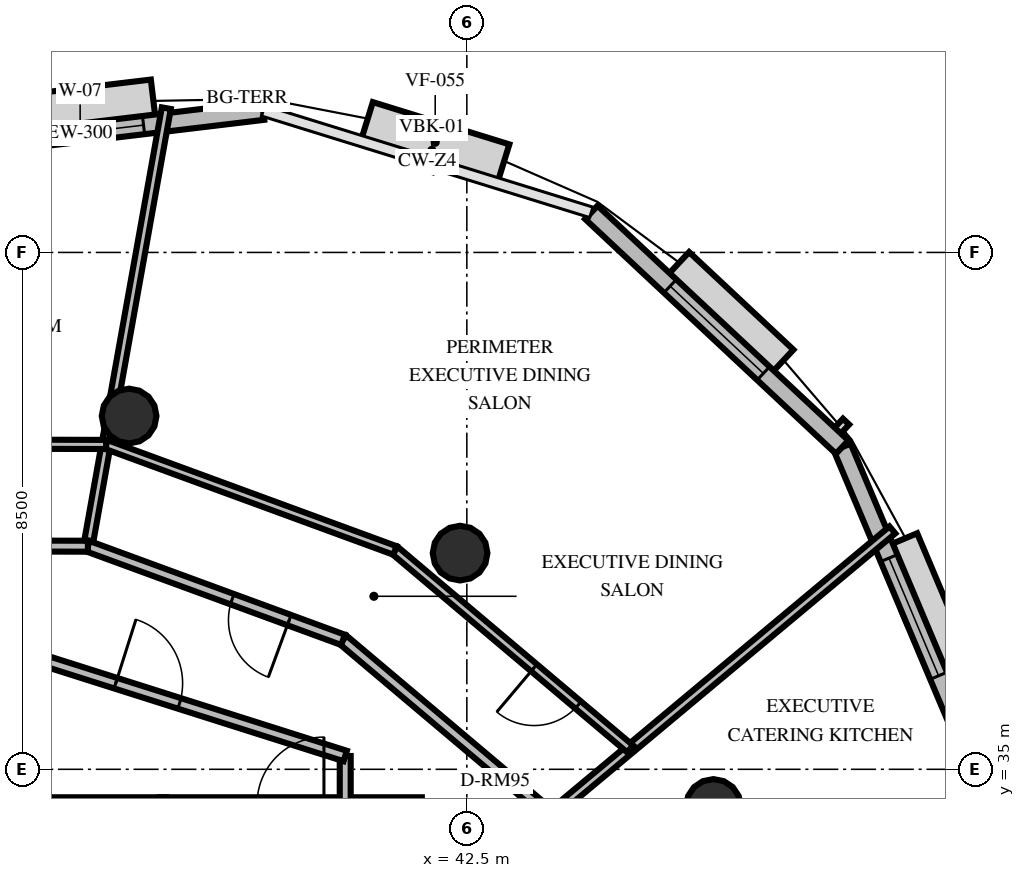
"""IFC4 building model, lengths in metres.
Left out: names, types, materials, properties, quantities, classifications, styles, units other than length and angle.
Written with IfcOpenShell. Run it as: python <this file> out.ifc"""

import sys

from ifc_helpers import new_model, si_unit, direction, frame, frame_2d, origin, origin_2d, place, context, subcontext, project, spatial, rectangle, circle, extrude, element, fill, save


model = new_model("IFC4")
c1 = context("Model", 3, precision=1e-05, world=origin(), true_north=direction((0.0, 1.0)))
c2 = subcontext(c1, "Body", "Model", "MODEL_VIEW")
j1 = project(units=[si_unit("LENGTHUNIT", "METRE"), si_unit("PLANEANGLEUNIT", "RADIAN")], contexts=[c1])
p1 = place(None, origin())
s1 = spatial("IfcSite", under=j1, at=p1, CompositionType="ELEMENT")
p2 = place(p1, origin())
s2 = spatial("IfcBuilding", under=s1, at=p2, CompositionType="ELEMENT")
p3 = place(p2, frame((0.0, 0.0, 277.2)))
s3 = spatial("IfcBuildingStorey", under=s2, at=p3, CompositionType="ELEMENT", Elevation=277.2)
for number, where, z_axis, x_axis in (
    (1, (46.555, 34.389, 0.0), (0.0, 0.0, 1.0), (1.0, 0.0, 0.0)),
    (2, (42.389, 38.555, 0.0), (0.0, 0.0, 1.0), (1.0, 0.0, 0.0)),
    (3, (36.946, 40.81, 0.0), (0.0, 0.0, 1.0), (1.0, 0.0, 0.0)),
):
    element("IfcColumn", number, at=place(p3, frame(where, z_axis=z_axis, x_axis=x_axis)), inside=s3, PredefinedType="COLUMN", context=c2, shape_type="SweptSolid", body=[
        extrude(circle(Radius=0.45, at=origin_2d()), origin(), (0.0, 0.0, 1.0), 3.6),
    ])
p4 = place(p3, frame((39.15, 45.83, 0.0), z_axis=(0.0, 0.0, 1.0), x_axis=(-0.992897596108, -0.118972112883, 0.0)))
e4 = element("IfcWall", 4, at=p4, inside=s3, PredefinedType="SOLIDWALL", context=c2, shape_type="SweptSolid", body=[
    extrude(rectangle(XDim=6.062, YDim=0.3, at=frame_2d((3.031, 0.0))), origin(), (0.0, 0.0, 1.0), 2.76),
])
p5 = place(p4, frame((1.981, 0.0, 0.8)))
e5 = element("IfcOpeningElement", 5, at=p5, cuts=e4, PredefinedType="OPENING", context=c2, shape_type="SweptSolid", body=[
    extrude(rectangle(XDim=2.1, YDim=1.85, at=frame_2d((1.05, 0.925))), frame((0.0, 0.16, 0.0), z_axis=(0.0, -1.0, 0.0), x_axis=(1.0, 0.0, 0.0)), (0.0, 0.0, 1.0), 0.32),
])
p6 = place(p3, frame((51.029, 34.713, 0.0), z_axis=(0.0, 0.0, 1.0), x_axis=(-0.388609687406, 0.921402469529, 0.0)))
e6 = element("IfcWall", 6, at=p6, inside=s3, PredefinedType="SOLIDWALL", context=c2, shape_type="SweptSolid", body=[
    extrude(rectangle(XDim=6.062, YDim=0.3, at=frame_2d((3.031, 0.0))), origin(), (0.0, 0.0, 1.0), 2.76),
])
p7 = place(p6, frame((1.981, 0.0, 0.8)))
e7 = element("IfcOpeningElement", 7, at=p7, cuts=e6, PredefinedType="OPENING", context=c2, shape_type="SweptSolid", body=[
    extrude(rectangle(XDim=2.1, YDim=1.85, at=frame_2d((1.05, 0.925))), frame((0.0, 0.16, 0.0), z_axis=(0.0, -1.0, 0.0), x_axis=(1.0, 0.0, 0.0)), (0.0, 0.0, 1.0), 0.32),
])
p8 = place(p3, frame((48.673, 40.298, 0.0), z_axis=(0.0, 0.0, 1.0), x_axis=(-0.730137889504, 0.68329983339, 0.0)))
e8 = element("IfcWall", 8, at=p8, inside=s3, PredefinedType="SOLIDWALL", context=c2, shape_type="SweptSolid", body=[
    extrude(rectangle(XDim=5.65, YDim=0.3, at=frame_2d((2.825, 0.0))), origin(), (0.0, 0.0, 1.0), 2.76),
])
p9 = place(p8, frame((1.775, 0.0, 0.8)))
e9 = element("IfcOpeningElement", 9, at=p9, cuts=e8, PredefinedType="OPENING", context=c2, shape_type="SweptSolid", body=[
    extrude(rectangle(XDim=2.1, YDim=1.85, at=frame_2d((1.05, 0.925))), frame((0.0, 0.16, 0.0), z_axis=(0.0, -1.0, 0.0), x_axis=(1.0, 0.0, 0.0)), (0.0, 0.0, 1.0), 0.32),
])
p10 = place(p3, frame((37.45, 34.43, 0.0), z_axis=(0.0, 0.0, 1.0), x_axis=(1.0, 0.0, 0.0)))
e10 = element("IfcWall", 10, at=p10, inside=s3, PredefinedType="SOLIDWALL", context=c2, shape_type="SweptSolid", body=[
    extrude(rectangle(XDim=4.31, YDim=0.22, at=frame_2d((2.155, 0.0))), origin(), (0.0, 0.0, 1.0), 2.46),
])
p11 = place(p10, frame((1.6, 0.0, 0.0)))
e11 = element("IfcOpeningElement", 11, at=p11, cuts=e10, PredefinedType="OPENING", context=c2, shape_type="SweptSolid", body=[
    extrude(rectangle(XDim=1.1, YDim=2.15, at=frame_2d((0.55, 1.075))), frame((0.0, 0.12, 0.0), z_axis=(0.0, -1.0, 0.0), x_axis=(1.0, 0.0, 0.0)), (0.0, 0.0, 1.0), 0.24),
])
p12 = place(p3, frame((30.44, 34.43, 0.0), z_axis=(0.0, 0.0, 1.0), x_axis=(1.0, 0.0, 0.0)))
e12 = element("IfcWall", 12, at=p12, inside=s3, PredefinedType="SOLIDWALL", context=c2, shape_type="SweptSolid", body=[
    extrude(rectangle(XDim=7.12, YDim=0.22, at=frame_2d((3.56, 0.0))), origin(), (0.0, 0.0, 1.0), 2.46),
])
p13 = place(p12, frame((3.01, 0.0, 0.0)))
e13 = element("IfcOpeningElement", 13, at=p13, cuts=e12, PredefinedType="OPENING", context=c2, shape_type="SweptSolid", body=[
    extrude(rectangle(XDim=1.1, YDim=2.15, at=frame_2d((0.55, 1.075))), frame((0.0, 0.12, 0.0), z_axis=(0.0, -1.0, 0.0), x_axis=(1.0, 0.0, 0.0)), (0.0, 0.0, 1.0), 0.24),
])
p14 = place(p3, frame((40.5, 35.219, 0.0), z_axis=(0.0, 0.0, 1.0), x_axis=(0.0, -1.0, 0.0)))
e14 = element("IfcWall", 14, at=p14, inside=s3, PredefinedType="PARTITIONING", context=c2, shape_type="SweptSolid", body=[
    extrude(rectangle(XDim=0.789, YDim=0.18, at=frame_2d((0.395, 0.0))), origin(), (0.0, 0.0, 1.0), 2.46),
])
p15 = place(p3, frame((34.0, 37.28, 0.0), z_axis=(0.0, 0.0, 1.0), x_axis=(0.953228121756, -0.302251795518, 0.0)))
e15 = element("IfcWall", 15, at=p15, inside=s3, PredefinedType="PARTITIONING", context=c2, shape_type="SweptSolid", body=[
    extrude(rectangle(XDim=6.819, YDim=0.18, at=frame_2d((3.409, 0.0))), origin(), (0.0, 0.0, 1.0), 2.46),
])
p16 = place(p15, frame((2.86, 0.0, 0.0)))
e16 = element("IfcOpeningElement", 16, at=p16, cuts=e15, PredefinedType="OPENING", context=c2, shape_type="SweptSolid", body=[
    extrude(rectangle(XDim=1.1, YDim=2.15, at=frame_2d((0.55, 1.075))), frame((0.0, 0.1, 0.0), z_axis=(0.0, -1.0, 0.0), x_axis=(1.0, 0.0, 0.0)), (0.0, 0.0, 1.0), 0.2),
])
p17 = place(p3, frame((43.881, 34.247, 0.0), z_axis=(0.0, 0.0, 1.0), x_axis=(0.767720640374, 0.640784689536, 0.0)))
e17 = element("IfcWall", 17, at=p17, inside=s3, PredefinedType="PARTITIONING", context=c2, shape_type="SweptSolid", body=[
    extrude(rectangle(XDim=7.318, YDim=0.15, at=frame_2d((3.659, 0.0))), origin(), (0.0, 0.0, 1.0), 2.46),
])
p18 = place(p3, frame((36.268, 38.669, 0.0), z_axis=(0.0, 0.0, 1.0), x_axis=(0.176213223455, 0.984352020306, 0.0)))
e18 = element("IfcWall", 18, at=p18, inside=s3, PredefinedType="PARTITIONING", context=c2, shape_type="SweptSolid", body=[
    extrude(rectangle(XDim=7.318, YDim=0.15, at=frame_2d((3.659, 0.0))), origin(), (0.0, 0.0, 1.0), 2.46),
])
p19 = place(p3, frame((43.881, 34.247, 0.0), z_axis=(0.0, 0.0, 1.0), x_axis=(-0.764357098744, 0.644793164976, 0.0)))
e19 = element("IfcWall", 19, at=p19, inside=s3, PredefinedType="PARTITIONING", context=c2, shape_type="SweptSolid", body=[
    extrude(rectangle(XDim=4.47, YDim=0.18, at=frame_2d((2.235, 0.0))), origin(), (0.0, 0.0, 1.0), 2.46),
])
p20 = place(p3, frame((40.464, 37.129, 0.0), z_axis=(0.0, 0.0, 1.0), x_axis=(-0.938786245945, 0.3445001951, 0.0)))
e20 = element("IfcWall", 20, at=p20, inside=s3, PredefinedType="PARTITIONING", context=c2, shape_type="SweptSolid", body=[
    extrude(rectangle(XDim=4.47, YDim=0.18, at=frame_2d((2.235, 0.0))), origin(), (0.0, 0.0, 1.0), 2.46),
])
p21 = place(p20, frame((0.942, 0.0, 0.0)))
e21 = element("IfcOpeningElement", 21, at=p21, cuts=e20, PredefinedType="OPENING", context=c2, shape_type="SweptSolid", body=[
    extrude(rectangle(XDim=1.0, YDim=2.15, at=frame_2d((0.5, 1.075))), frame((0.0, 0.1, 0.0), z_axis=(0.0, -1.0, 0.0), x_axis=(1.0, 0.0, 0.0)), (0.0, 0.0, 1.0), 0.2),
])
p22 = place(p3, frame((45.186, 35.336, 0.0), z_axis=(0.0, 0.0, 1.0), x_axis=(-0.764355389284, 0.644795191415, 0.0)))
e22 = element("IfcWall", 22, at=p22, inside=s3, PredefinedType="PARTITIONING", context=c2, shape_type="SweptSolid", body=[
    extrude(rectangle(XDim=5.06, YDim=0.15, at=frame_2d((2.53, 0.0))), origin(), (0.0, 0.0, 1.0), 2.46),
])
p23 = place(p22, frame((1.117, 0.0, 0.0)))
e23 = element("IfcOpeningElement", 23, at=p23, cuts=e22, PredefinedType="OPENING", context=c2, shape_type="SweptSolid", body=[
    extrude(rectangle(XDim=0.95, YDim=2.15, at=frame_2d((0.475, 1.075))), frame((0.0, 0.085, 0.0), z_axis=(0.0, -1.0, 0.0), x_axis=(1.0, 0.0, 0.0)), (0.0, 0.0, 1.0), 0.17),
])
p24 = place(p3, frame((41.318, 38.599, 0.0), z_axis=(0.0, 0.0, 1.0), x_axis=(-0.938792079833, 0.344484296948, 0.0)))
e24 = element("IfcWall", 24, at=p24, inside=s3, PredefinedType="PARTITIONING", context=c2, shape_type="SweptSolid", body=[
    extrude(rectangle(XDim=5.06, YDim=0.15, at=frame_2d((2.53, 0.0))), origin(), (0.0, 0.0, 1.0), 2.46),
])
p25 = place(p3, frame((36.268, 38.669, 0.0), z_axis=(0.0, 0.0, 1.0), x_axis=(-0.999996563088, 0.002621795665, 0.0)))
e25 = element("IfcWall", 25, at=p25, inside=s3, PredefinedType="PARTITIONING", context=c2, shape_type="SweptSolid", body=[
    extrude(rectangle(XDim=4.47, YDim=0.18, at=frame_2d((2.235, 0.0))), origin(), (0.0, 0.0, 1.0), 2.46),
])
p26 = place(p25, frame((1.735, 0.0, 0.0)))
e26 = element("IfcOpeningElement", 26, at=p26, cuts=e25, PredefinedType="OPENING", context=c2, shape_type="SweptSolid", body=[
    extrude(rectangle(XDim=1.0, YDim=2.15, at=frame_2d((0.5, 1.075))), frame((0.0, 0.1, 0.0), z_axis=(0.0, -1.0, 0.0), x_axis=(1.0, 0.0, 0.0)), (0.0, 0.0, 1.0), 0.2),
])
p27 = place(p3, frame((36.568, 40.342, 0.0), z_axis=(0.0, 0.0, 1.0), x_axis=(-0.999996605902, 0.002605414297, 0.0)))
e27 = element("IfcWall", 27, at=p27, inside=s3, PredefinedType="PARTITIONING", context=c2, shape_type="SweptSolid", body=[
    extrude(rectangle(XDim=5.06, YDim=0.15, at=frame_2d((2.53, 0.0))), origin(), (0.0, 0.0, 1.0), 2.46),
])
p28 = place(p27, frame((2.055, 0.0, 0.0)))
e28 = element("IfcOpeningElement", 28, at=p28, cuts=e27, PredefinedType="OPENING", context=c2, shape_type="SweptSolid", body=[
    extrude(rectangle(XDim=0.95, YDim=2.15, at=frame_2d((0.475, 1.075))), frame((0.0, 0.085, 0.0), z_axis=(0.0, -1.0, 0.0), x_axis=(1.0, 0.0, 0.0)), (0.0, 0.0, 1.0), 0.17),
])
p29 = place(p5, origin())
e29 = element("IfcWindow", 29, at=p29, inside=s3, PartitioningType="SINGLE_PANEL", PredefinedType="WINDOW", context=c2, shape_type="SweptSolid", body=[
    extrude(rectangle(XDim=2.1, YDim=1.85, at=frame_2d((1.05, 0.925))), frame((0.0, 0.03, 0.0), z_axis=(0.0, -1.0, 0.0), x_axis=(1.0, 0.0, 0.0)), (0.0, 0.0, 1.0), 0.06),
])
fill(e5, e29)
p30 = place(p7, origin())
e30 = element("IfcWindow", 30, at=p30, inside=s3, PartitioningType="SINGLE_PANEL", PredefinedType="WINDOW", context=c2, shape_type="SweptSolid", body=[
    extrude(rectangle(XDim=2.1, YDim=1.85, at=frame_2d((1.05, 0.925))), frame((0.0, 0.03, 0.0), z_axis=(0.0, -1.0, 0.0), x_axis=(1.0, 0.0, 0.0)), (0.0, 0.0, 1.0), 0.06),
])
fill(e7, e30)
p31 = place(p9, origin())
e31 = element("IfcWindow", 31, at=p31, inside=s3, PartitioningType="SINGLE_PANEL", PredefinedType="WINDOW", context=c2, shape_type="SweptSolid", body=[
    extrude(rectangle(XDim=2.1, YDim=1.85, at=frame_2d((1.05, 0.925))), frame((0.0, 0.03, 0.0), z_axis=(0.0, -1.0, 0.0), x_axis=(1.0, 0.0, 0.0)), (0.0, 0.0, 1.0), 0.06),
])
fill(e9, e31)
p32 = place(p16, origin())
e32 = element("IfcDoor", 32, at=p32, inside=s3, OperationType="SINGLE_SWING_LEFT", PredefinedType="DOOR", context=c2, shape_type="SweptSolid", body=[
    extrude(rectangle(XDim=1.1, YDim=2.15, at=frame_2d((0.55, 1.075))), frame((0.0, 0.025, 0.0), z_axis=(0.0, -1.0, 0.0), x_axis=(1.0, 0.0, 0.0)), (0.0, 0.0, 1.0), 0.05),
])
fill(e16, e32)
p33 = place(p21, origin())
e33 = element("IfcDoor", 33, at=p33, inside=s3, OperationType="SINGLE_SWING_LEFT", PredefinedType="DOOR", context=c2, shape_type="SweptSolid", body=[
    extrude(rectangle(XDim=1.0, YDim=2.15, at=frame_2d((0.5, 1.075))), frame((0.0, 0.025, 0.0), z_axis=(0.0, -1.0, 0.0), x_axis=(1.0, 0.0, 0.0)), (0.0, 0.0, 1.0), 0.05),
])
fill(e21, e33)
p34 = place(p23, origin())
e34 = element("IfcDoor", 34, at=p34, inside=s3, OperationType="SINGLE_SWING_RIGHT", PredefinedType="DOOR", context=c2, shape_type="SweptSolid", body=[
    extrude(rectangle(XDim=0.95, YDim=2.15, at=frame_2d((0.475, 1.075))), frame((0.0, 0.025, 0.0), z_axis=(0.0, -1.0, 0.0), x_axis=(1.0, 0.0, 0.0)), (0.0, 0.0, 1.0), 0.05),
])
fill(e23, e34)
save(model, sys.argv[1])
